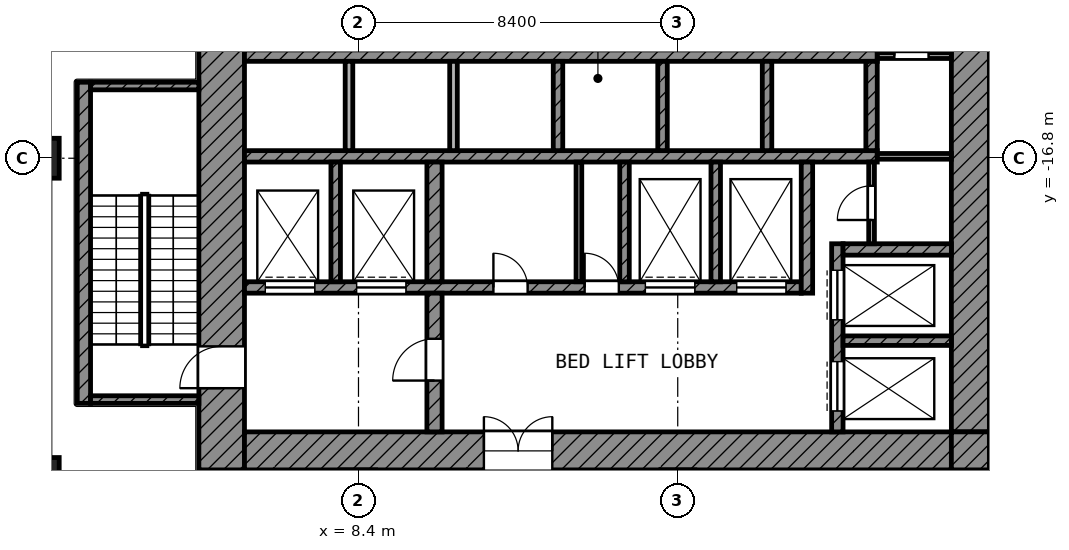
"""IFC4 building model, lengths in metres.
Left out: names, types, materials, properties, quantities, classifications, styles, units other than length and angle.
Written with IfcOpenShell. Run it as: python <this file> out.ifc"""

import sys

from ifc_helpers import new_model, si_unit, direction, frame, frame_2d, origin, origin_2d, place, context, subcontext, project, spatial, rectangle, extrude, element, fill, save


model = new_model("IFC4")
c1 = context("Model", 3, precision=1e-05, world=origin(), true_north=direction((0.0, 1.0)))
c2 = subcontext(c1, "Body", "Model", "MODEL_VIEW")
j1 = project(units=[si_unit("LENGTHUNIT", "METRE"), si_unit("PLANEANGLEUNIT", "RADIAN")], contexts=[c1])
p1 = place(None, origin())
s1 = spatial("IfcSite", under=j1, at=p1, CompositionType="ELEMENT")
p2 = place(p1, origin())
s2 = spatial("IfcBuilding", under=s1, at=p2, CompositionType="ELEMENT")
p3 = place(p2, frame((0.0, 0.0, 93.8)))
s3 = spatial("IfcBuildingStorey", under=s2, at=p3, CompositionType="ELEMENT", Elevation=93.8)
for number, where, z_axis, x_axis in (
    (1, (0.0, -16.8, 0.0), (0.0, 0.0, 1.0), (1.0, 0.0, 0.0)),
    (2, (0.0, -25.2, 0.0), (0.0, 0.0, 1.0), (1.0, 0.0, 0.0)),
):
    element("IfcColumn", number, at=place(p3, frame(where, z_axis=z_axis, x_axis=x_axis)), inside=s3, PredefinedType="COLUMN", context=c2, shape_type="SweptSolid", body=[
        extrude(rectangle(XDim=1.05, YDim=1.05, at=origin_2d()), origin(), (0.0, 0.0, 1.0), 5.0),
    ])
p4 = place(p3, frame((4.8, -25.0, 0.0), z_axis=(0.0, 0.0, 1.0), x_axis=(0.0, 1.0, 0.0)))
e3 = element("IfcWall", 3, at=p4, inside=s3, PredefinedType="SHEAR", context=c2, shape_type="SweptSolid", body=[
    extrude(rectangle(XDim=19.6, YDim=1.2, at=frame_2d((9.8, 0.0))), origin(), (0.0, 0.0, 1.0), 4.4),
])
p5 = place(p4, frame((11.45, 0.0, 0.0)))
e4 = element("IfcOpeningElement", 4, at=p5, cuts=e3, PredefinedType="OPENING", context=c2, shape_type="SweptSolid", body=[
    extrude(rectangle(XDim=1.1, YDim=2.1, at=frame_2d((0.55, 1.05))), frame((0.0, 0.61, 0.0), z_axis=(0.0, -1.0, 0.0), x_axis=(1.0, 0.0, 0.0)), (0.0, 0.0, 1.0), 1.22),
])
p6 = place(p4, frame((2.15, 0.0, 0.0)))
e5 = element("IfcOpeningElement", 5, at=p6, cuts=e3, PredefinedType="OPENING", context=c2, shape_type="SweptSolid", body=[
    extrude(rectangle(XDim=1.1, YDim=2.1, at=frame_2d((0.55, 1.05))), frame((0.0, 0.61, 0.0), z_axis=(0.0, -1.0, 0.0), x_axis=(1.0, 0.0, 0.0)), (0.0, 0.0, 1.0), 1.22),
])
p7 = place(p3, frame((24.5, -24.0, 0.0), z_axis=(0.0, 0.0, 1.0), x_axis=(0.0, 1.0, 0.0)))
e6 = element("IfcWall", 6, at=p7, inside=s3, PredefinedType="SHEAR", context=c2, shape_type="SweptSolid", body=[
    extrude(rectangle(XDim=18.6, YDim=1.0, at=frame_2d((9.3, 0.0))), origin(), (0.0, 0.0, 1.0), 4.4),
])
p8 = place(p7, frame((10.5, 0.0, 0.0)))
e7 = element("IfcOpeningElement", 7, at=p8, cuts=e6, PredefinedType="OPENING", context=c2, shape_type="SweptSolid", body=[
    extrude(rectangle(XDim=1.8, YDim=2.1, at=frame_2d((0.9, 1.05))), frame((0.0, 0.51, 0.0), z_axis=(0.0, -1.0, 0.0), x_axis=(1.0, 0.0, 0.0)), (0.0, 0.0, 1.0), 1.02),
])
p9 = place(p3, frame((5.4, -24.5, 0.0), z_axis=(0.0, 0.0, 1.0), x_axis=(1.0, 0.0, 0.0)))
e8 = element("IfcWall", 8, at=p9, inside=s3, PredefinedType="SHEAR", context=c2, shape_type="SweptSolid", body=[
    extrude(rectangle(XDim=18.6, YDim=1.0, at=frame_2d((9.3, 0.0))), origin(), (0.0, 0.0, 1.0), 4.4),
])
p10 = place(p9, frame((6.3, 0.0, 0.0)))
e9 = element("IfcOpeningElement", 9, at=p10, cuts=e8, PredefinedType="OPENING", context=c2, shape_type="SweptSolid", body=[
    extrude(rectangle(XDim=1.8, YDim=2.1, at=frame_2d((0.9, 1.05))), frame((0.0, 0.51, 0.0), z_axis=(0.0, -1.0, 0.0), x_axis=(1.0, 0.0, 0.0)), (0.0, 0.0, 1.0), 1.02),
])
p11 = place(p3, frame((24.5, -25.0, 0.0), z_axis=(0.0, 0.0, 1.0), x_axis=(0.0, 1.0, 0.0)))
e10 = element("IfcWall", 10, at=p11, inside=s3, PredefinedType="SHEAR", context=c2, shape_type="SweptSolid", body=[
    extrude(rectangle(XDim=1.0, YDim=1.0, at=frame_2d((0.5, 0.0))), origin(), (0.0, 0.0, 1.0), 4.4),
])
for number, where, z_axis, x_axis in (
    (11, (5.4, -14.1, 0.0), (0.0, 0.0, 1.0), (1.0, 0.0, 0.0)),
    (12, (5.4, -16.75, 0.0), (0.0, 0.0, 1.0), (1.0, 0.0, 0.0)),
):
    element("IfcWall", number, at=place(p3, frame(where, z_axis=z_axis, x_axis=x_axis)), inside=s3, PredefinedType="SHEAR", context=c2, shape_type="SweptSolid", body=[
        extrude(rectangle(XDim=16.65, YDim=0.3, at=frame_2d((8.325, 0.0))), origin(), (0.0, 0.0, 1.0), 4.4),
    ])
p12 = place(p3, frame((5.4, -20.2, 0.0), z_axis=(0.0, 0.0, 1.0), x_axis=(1.0, 0.0, 0.0)))
e13 = element("IfcWall", 13, at=p12, inside=s3, PredefinedType="SHEAR", context=c2, shape_type="SweptSolid", body=[
    extrude(rectangle(XDim=14.65, YDim=0.3, at=frame_2d((7.325, 0.0))), origin(), (0.0, 0.0, 1.0), 4.4),
])
p13 = place(p12, frame((10.55, 0.0, 0.0)))
e14 = element("IfcOpeningElement", 14, at=p13, cuts=e13, PredefinedType="OPENING", context=c2, shape_type="SweptSolid", body=[
    extrude(rectangle(XDim=1.3, YDim=2.1, at=frame_2d((0.65, 1.05))), frame((0.0, 0.16, 0.0), z_axis=(0.0, -1.0, 0.0), x_axis=(1.0, 0.0, 0.0)), (0.0, 0.0, 1.0), 0.32),
])
p14 = place(p12, frame((12.95, 0.0, 0.0)))
e15 = element("IfcOpeningElement", 15, at=p14, cuts=e13, PredefinedType="OPENING", context=c2, shape_type="SweptSolid", body=[
    extrude(rectangle(XDim=1.3, YDim=2.1, at=frame_2d((0.65, 1.05))), frame((0.0, 0.16, 0.0), z_axis=(0.0, -1.0, 0.0), x_axis=(1.0, 0.0, 0.0)), (0.0, 0.0, 1.0), 0.32),
])
p15 = place(p12, frame((0.55, 0.0, 0.0)))
e16 = element("IfcOpeningElement", 16, at=p15, cuts=e13, PredefinedType="OPENING", context=c2, shape_type="SweptSolid", body=[
    extrude(rectangle(XDim=1.3, YDim=2.1, at=frame_2d((0.65, 1.05))), frame((0.0, 0.16, 0.0), z_axis=(0.0, -1.0, 0.0), x_axis=(1.0, 0.0, 0.0)), (0.0, 0.0, 1.0), 0.32),
])
p16 = place(p12, frame((2.95, 0.0, 0.0)))
e17 = element("IfcOpeningElement", 17, at=p16, cuts=e13, PredefinedType="OPENING", context=c2, shape_type="SweptSolid", body=[
    extrude(rectangle(XDim=1.3, YDim=2.1, at=frame_2d((0.65, 1.05))), frame((0.0, 0.16, 0.0), z_axis=(0.0, -1.0, 0.0), x_axis=(1.0, 0.0, 0.0)), (0.0, 0.0, 1.0), 0.32),
])
p17 = place(p12, frame((6.55, 0.0, 0.0)))
e18 = element("IfcOpeningElement", 18, at=p17, cuts=e13, PredefinedType="OPENING", context=c2, shape_type="SweptSolid", body=[
    extrude(rectangle(XDim=0.9, YDim=2.1, at=frame_2d((0.45, 1.05))), frame((0.0, 0.16, 0.0), z_axis=(0.0, -1.0, 0.0), x_axis=(1.0, 0.0, 0.0)), (0.0, 0.0, 1.0), 0.32),
])
p18 = place(p12, frame((8.95, 0.0, 0.0)))
e19 = element("IfcOpeningElement", 19, at=p18, cuts=e13, PredefinedType="OPENING", context=c2, shape_type="SweptSolid", body=[
    extrude(rectangle(XDim=0.9, YDim=2.1, at=frame_2d((0.45, 1.05))), frame((0.0, 0.16, 0.0), z_axis=(0.0, -1.0, 0.0), x_axis=(1.0, 0.0, 0.0)), (0.0, 0.0, 1.0), 0.32),
])
p19 = place(p3, frame((10.4, -24.0, 0.0), z_axis=(0.0, 0.0, 1.0), x_axis=(0.0, 1.0, 0.0)))
e20 = element("IfcWall", 20, at=p19, inside=s3, PredefinedType="SHEAR", context=c2, shape_type="SweptSolid", body=[
    extrude(rectangle(XDim=3.65, YDim=0.4, at=frame_2d((1.825, 0.0))), origin(), (0.0, 0.0, 1.0), 4.4),
])
p20 = place(p19, frame((1.35, 0.0, 0.0)))
e21 = element("IfcOpeningElement", 21, at=p20, cuts=e20, PredefinedType="OPENING", context=c2, shape_type="SweptSolid", body=[
    extrude(rectangle(XDim=1.1, YDim=2.1, at=frame_2d((0.55, 1.05))), frame((0.0, 0.21, 0.0), z_axis=(0.0, -1.0, 0.0), x_axis=(1.0, 0.0, 0.0)), (0.0, 0.0, 1.0), 0.42),
])
p21 = place(p3, frame((10.4, -20.05, 0.0), z_axis=(0.0, 0.0, 1.0), x_axis=(0.0, 1.0, 0.0)))
e22 = element("IfcWall", 22, at=p21, inside=s3, PredefinedType="SHEAR", context=c2, shape_type="SweptSolid", body=[
    extrude(rectangle(XDim=3.15, YDim=0.4, at=frame_2d((1.575, 0.0))), origin(), (0.0, 0.0, 1.0), 4.4),
])
p22 = place(p3, frame((20.2, -20.35, 0.0), z_axis=(0.0, 0.0, 1.0), x_axis=(0.0, 1.0, 0.0)))
e23 = element("IfcWall", 23, at=p22, inside=s3, PredefinedType="SHEAR", context=c2, shape_type="SweptSolid", body=[
    extrude(rectangle(XDim=3.45, YDim=0.3, at=frame_2d((1.725, 0.0))), origin(), (0.0, 0.0, 1.0), 4.4),
])
p23 = place(p3, frame((21.9, -16.6, 0.0), z_axis=(0.0, 0.0, 1.0), x_axis=(0.0, 1.0, 0.0)))
e24 = element("IfcWall", 24, at=p23, inside=s3, PredefinedType="SHEAR", context=c2, shape_type="SweptSolid", body=[
    extrude(rectangle(XDim=2.35, YDim=0.3, at=frame_2d((1.175, 0.0))), origin(), (0.0, 0.0, 1.0), 4.4),
])
p24 = place(p3, frame((21.15, -19.2, 0.0), z_axis=(0.0, 0.0, 1.0), x_axis=(1.0, 0.0, 0.0)))
e25 = element("IfcWall", 25, at=p24, inside=s3, PredefinedType="SHEAR", context=c2, shape_type="SweptSolid", body=[
    extrude(rectangle(XDim=2.85, YDim=0.3, at=frame_2d((1.425, 0.0))), origin(), (0.0, 0.0, 1.0), 4.4),
])
p25 = place(p3, frame((21.0, -24.0, 0.0), z_axis=(0.0, 0.0, 1.0), x_axis=(0.0, 1.0, 0.0)))
e26 = element("IfcWall", 26, at=p25, inside=s3, PredefinedType="SHEAR", context=c2, shape_type="SweptSolid", body=[
    extrude(rectangle(XDim=4.95, YDim=0.3, at=frame_2d((2.475, 0.0))), origin(), (0.0, 0.0, 1.0), 4.4),
])
p26 = place(p25, frame((2.95, 0.0, 0.0)))
e27 = element("IfcOpeningElement", 27, at=p26, cuts=e26, PredefinedType="OPENING", context=c2, shape_type="SweptSolid", body=[
    extrude(rectangle(XDim=1.3, YDim=2.1, at=frame_2d((0.65, 1.05))), frame((0.0, 0.16, 0.0), z_axis=(0.0, -1.0, 0.0), x_axis=(1.0, 0.0, 0.0)), (0.0, 0.0, 1.0), 0.32),
])
p27 = place(p25, frame((0.55, 0.0, 0.0)))
e28 = element("IfcOpeningElement", 28, at=p27, cuts=e26, PredefinedType="OPENING", context=c2, shape_type="SweptSolid", body=[
    extrude(rectangle(XDim=1.3, YDim=2.1, at=frame_2d((0.65, 1.05))), frame((0.0, 0.16, 0.0), z_axis=(0.0, -1.0, 0.0), x_axis=(1.0, 0.0, 0.0)), (0.0, 0.0, 1.0), 0.32),
])
p28 = place(p3, frame((21.15, -21.6, 0.0), z_axis=(0.0, 0.0, 1.0), x_axis=(1.0, 0.0, 0.0)))
e29 = element("IfcWall", 29, at=p28, inside=s3, PredefinedType="SHEAR", context=c2, shape_type="SweptSolid", body=[
    extrude(rectangle(XDim=2.85, YDim=0.25, at=frame_2d((1.425, 0.0))), origin(), (0.0, 0.0, 1.0), 4.4),
])
for number, where, z_axis, x_axis in (
    (30, (7.8, -20.05, 0.0), (0.0, 0.0, 1.0), (0.0, 1.0, 0.0)),
    (31, (15.4, -20.05, 0.0), (0.0, 0.0, 1.0), (0.0, 1.0, 0.0)),
    (32, (17.8, -20.05, 0.0), (0.0, 0.0, 1.0), (0.0, 1.0, 0.0)),
):
    element("IfcWall", number, at=place(p3, frame(where, z_axis=z_axis, x_axis=x_axis)), inside=s3, PredefinedType="SHEAR", context=c2, shape_type="SweptSolid", body=[
        extrude(rectangle(XDim=3.15, YDim=0.25, at=frame_2d((1.575, 0.0))), origin(), (0.0, 0.0, 1.0), 4.4),
    ])
for number, where, z_axis, x_axis in (
    (33, (8.15, -16.6, 0.0), (0.0, 0.0, 1.0), (0.0, 1.0, 0.0)),
    (34, (10.9, -16.6, 0.0), (0.0, 0.0, 1.0), (0.0, 1.0, 0.0)),
):
    element("IfcWall", number, at=place(p3, frame(where, z_axis=z_axis, x_axis=x_axis)), inside=s3, PredefinedType="PARTITIONING", context=c2, shape_type="SweptSolid", body=[
        extrude(rectangle(XDim=2.35, YDim=0.2, at=frame_2d((1.175, 0.0))), origin(), (0.0, 0.0, 1.0), 4.4),
    ])
for number, where, z_axis, x_axis in (
    (35, (13.65, -16.6, 0.0), (0.0, 0.0, 1.0), (0.0, 1.0, 0.0)),
    (36, (16.4, -16.6, 0.0), (0.0, 0.0, 1.0), (0.0, 1.0, 0.0)),
    (37, (19.15, -16.6, 0.0), (0.0, 0.0, 1.0), (0.0, 1.0, 0.0)),
):
    element("IfcWall", number, at=place(p3, frame(where, z_axis=z_axis, x_axis=x_axis)), inside=s3, PredefinedType="SHEAR", context=c2, shape_type="SweptSolid", body=[
        extrude(rectangle(XDim=2.35, YDim=0.25, at=frame_2d((1.175, 0.0))), origin(), (0.0, 0.0, 1.0), 4.4),
    ])
p29 = place(p3, frame((21.9, -19.05, 0.0), z_axis=(0.0, 0.0, 1.0), x_axis=(0.0, 1.0, 0.0)))
e38 = element("IfcWall", 38, at=p29, inside=s3, PredefinedType="PARTITIONING", context=c2, shape_type="SweptSolid", body=[
    extrude(rectangle(XDim=2.15, YDim=0.15, at=frame_2d((1.075, 0.0))), origin(), (0.0, 0.0, 1.0), 4.4),
])
p30 = place(p29, frame((0.625, 0.0, 0.0)))
e39 = element("IfcOpeningElement", 39, at=p30, cuts=e38, PredefinedType="OPENING", context=c2, shape_type="SweptSolid", body=[
    extrude(rectangle(XDim=0.9, YDim=2.1, at=frame_2d((0.45, 1.05))), frame((0.0, 0.085, 0.0), z_axis=(0.0, -1.0, 0.0), x_axis=(1.0, 0.0, 0.0)), (0.0, 0.0, 1.0), 0.17),
])
p31 = place(p3, frame((22.05, -16.75, 0.0), z_axis=(0.0, 0.0, 1.0), x_axis=(1.0, 0.0, 0.0)))
e40 = element("IfcWall", 40, at=p31, inside=s3, PredefinedType="PARTITIONING", context=c2, shape_type="SweptSolid", body=[
    extrude(rectangle(XDim=1.95, YDim=0.15, at=frame_2d((0.975, 0.0))), origin(), (0.0, 0.0, 1.0), 4.4),
])
p32 = place(p3, frame((22.05, -14.1, 0.0), z_axis=(0.0, 0.0, 1.0), x_axis=(1.0, 0.0, 0.0)))
e41 = element("IfcWall", 41, at=p32, inside=s3, PredefinedType="PARTITIONING", context=c2, shape_type="SweptSolid", body=[
    extrude(rectangle(XDim=1.95, YDim=0.15, at=frame_2d((0.975, 0.0))), origin(), (0.0, 0.0, 1.0), 4.4),
])
p33 = place(p32, frame((0.45, 0.0, 0.0)))
e42 = element("IfcOpeningElement", 42, at=p33, cuts=e41, PredefinedType="OPENING", context=c2, shape_type="SweptSolid", body=[
    extrude(rectangle(XDim=0.9, YDim=2.1, at=frame_2d((0.45, 1.05))), frame((0.0, 0.085, 0.0), z_axis=(0.0, -1.0, 0.0), x_axis=(1.0, 0.0, 0.0)), (0.0, 0.0, 1.0), 0.17),
])
p34 = place(p3, frame((14.2, -20.05, 0.0), z_axis=(0.0, 0.0, 1.0), x_axis=(0.0, 1.0, 0.0)))
e43 = element("IfcWall", 43, at=p34, inside=s3, PredefinedType="PARTITIONING", context=c2, shape_type="SweptSolid", body=[
    extrude(rectangle(XDim=3.15, YDim=0.15, at=frame_2d((1.575, 0.0))), origin(), (0.0, 0.0, 1.0), 4.4),
])
p35 = place(p3, frame((1.175, -23.25, 0.0), z_axis=(0.0, 0.0, 1.0), x_axis=(0.0, 1.0, 0.0)))
e44 = element("IfcWall", 44, at=p35, inside=s3, PredefinedType="SHEAR", context=c2, shape_type="SweptSolid", body=[
    extrude(rectangle(XDim=8.45, YDim=0.35, at=frame_2d((4.225, 0.0))), origin(), (0.0, 0.0, 1.0), 4.4),
])
for number, where, z_axis, x_axis in (
    (45, (1.35, -14.9, 0.0), (0.0, 0.0, 1.0), (1.0, 0.0, 0.0)),
    (46, (1.35, -23.15, 0.0), (0.0, 0.0, 1.0), (1.0, 0.0, 0.0)),
):
    element("IfcWall", number, at=place(p3, frame(where, z_axis=z_axis, x_axis=x_axis)), inside=s3, PredefinedType="SHEAR", context=c2, shape_type="SweptSolid", body=[
        extrude(rectangle(XDim=2.85, YDim=0.2, at=frame_2d((1.425, 0.0))), origin(), (0.0, 0.0, 1.0), 4.4),
    ])
p36 = place(p26, origin())
e47 = element("IfcDoor", 47, at=p36, inside=s3, OperationType="DOUBLE_DOOR_SLIDING", PredefinedType="DOOR", context=c2, shape_type="SweptSolid", body=[
    extrude(rectangle(XDim=1.3, YDim=2.1, at=frame_2d((0.65, 1.05))), frame((0.0, 0.025, 0.0), z_axis=(0.0, -1.0, 0.0), x_axis=(1.0, 0.0, 0.0)), (0.0, 0.0, 1.0), 0.05),
])
fill(e27, e47)
p37 = place(p27, origin())
e48 = element("IfcDoor", 48, at=p37, inside=s3, OperationType="DOUBLE_DOOR_SLIDING", PredefinedType="DOOR", context=c2, shape_type="SweptSolid", body=[
    extrude(rectangle(XDim=1.3, YDim=2.1, at=frame_2d((0.65, 1.05))), frame((0.0, 0.025, 0.0), z_axis=(0.0, -1.0, 0.0), x_axis=(1.0, 0.0, 0.0)), (0.0, 0.0, 1.0), 0.05),
])
fill(e28, e48)
p38 = place(p13, origin())
e49 = element("IfcDoor", 49, at=p38, inside=s3, OperationType="DOUBLE_DOOR_SLIDING", PredefinedType="DOOR", context=c2, shape_type="SweptSolid", body=[
    extrude(rectangle(XDim=1.3, YDim=2.1, at=frame_2d((0.65, 1.05))), frame((0.0, 0.025, 0.0), z_axis=(0.0, -1.0, 0.0), x_axis=(1.0, 0.0, 0.0)), (0.0, 0.0, 1.0), 0.05),
])
fill(e14, e49)
p39 = place(p14, origin())
e50 = element("IfcDoor", 50, at=p39, inside=s3, OperationType="DOUBLE_DOOR_SLIDING", PredefinedType="DOOR", context=c2, shape_type="SweptSolid", body=[
    extrude(rectangle(XDim=1.3, YDim=2.1, at=frame_2d((0.65, 1.05))), frame((0.0, 0.025, 0.0), z_axis=(0.0, -1.0, 0.0), x_axis=(1.0, 0.0, 0.0)), (0.0, 0.0, 1.0), 0.05),
])
fill(e15, e50)
p40 = place(p15, origin())
e51 = element("IfcDoor", 51, at=p40, inside=s3, OperationType="DOUBLE_DOOR_SLIDING", PredefinedType="DOOR", context=c2, shape_type="SweptSolid", body=[
    extrude(rectangle(XDim=1.3, YDim=2.1, at=frame_2d((0.65, 1.05))), frame((0.0, 0.025, 0.0), z_axis=(0.0, -1.0, 0.0), x_axis=(1.0, 0.0, 0.0)), (0.0, 0.0, 1.0), 0.05),
])
fill(e16, e51)
p41 = place(p16, origin())
e52 = element("IfcDoor", 52, at=p41, inside=s3, OperationType="DOUBLE_DOOR_SLIDING", PredefinedType="DOOR", context=c2, shape_type="SweptSolid", body=[
    extrude(rectangle(XDim=1.3, YDim=2.1, at=frame_2d((0.65, 1.05))), frame((0.0, 0.025, 0.0), z_axis=(0.0, -1.0, 0.0), x_axis=(1.0, 0.0, 0.0)), (0.0, 0.0, 1.0), 0.05),
])
fill(e17, e52)
p42 = place(p6, origin())
e53 = element("IfcDoor", 53, at=p42, inside=s3, OperationType="SINGLE_SWING_LEFT", PredefinedType="DOOR", context=c2, shape_type="SweptSolid", body=[
    extrude(rectangle(XDim=1.1, YDim=2.1, at=frame_2d((0.55, 1.05))), frame((0.0, 0.025, 0.0), z_axis=(0.0, -1.0, 0.0), x_axis=(1.0, 0.0, 0.0)), (0.0, 0.0, 1.0), 0.05),
])
fill(e5, e53)
p43 = place(p20, origin())
e54 = element("IfcDoor", 54, at=p43, inside=s3, OperationType="SINGLE_SWING_LEFT", PredefinedType="DOOR", context=c2, shape_type="SweptSolid", body=[
    extrude(rectangle(XDim=1.1, YDim=2.1, at=frame_2d((0.55, 1.05))), frame((0.0, 0.025, 0.0), z_axis=(0.0, -1.0, 0.0), x_axis=(1.0, 0.0, 0.0)), (0.0, 0.0, 1.0), 0.05),
])
fill(e21, e54)
p44 = place(p10, origin())
e55 = element("IfcDoor", 55, at=p44, inside=s3, OperationType="DOUBLE_DOOR_SINGLE_SWING", PredefinedType="DOOR", context=c2, shape_type="SweptSolid", body=[
    extrude(rectangle(XDim=1.8, YDim=2.1, at=frame_2d((0.9, 1.05))), frame((0.0, 0.025, 0.0), z_axis=(0.0, -1.0, 0.0), x_axis=(1.0, 0.0, 0.0)), (0.0, 0.0, 1.0), 0.05),
])
fill(e9, e55)
p45 = place(p33, origin())
e56 = element("IfcDoor", 56, at=p45, inside=s3, OperationType="SINGLE_SWING_LEFT", PredefinedType="DOOR", context=c2, shape_type="SweptSolid", body=[
    extrude(rectangle(XDim=0.9, YDim=2.1, at=frame_2d((0.45, 1.05))), frame((0.0, 0.025, 0.0), z_axis=(0.0, -1.0, 0.0), x_axis=(1.0, 0.0, 0.0)), (0.0, 0.0, 1.0), 0.05),
])
fill(e42, e56)
p46 = place(p30, origin())
e57 = element("IfcDoor", 57, at=p46, inside=s3, OperationType="SINGLE_SWING_LEFT", PredefinedType="DOOR", context=c2, shape_type="SweptSolid", body=[
    extrude(rectangle(XDim=0.9, YDim=2.1, at=frame_2d((0.45, 1.05))), frame((0.0, 0.025, 0.0), z_axis=(0.0, -1.0, 0.0), x_axis=(1.0, 0.0, 0.0)), (0.0, 0.0, 1.0), 0.05),
])
fill(e39, e57)
p47 = place(p17, origin())
e58 = element("IfcDoor", 58, at=p47, inside=s3, OperationType="SINGLE_SWING_LEFT", PredefinedType="DOOR", context=c2, shape_type="SweptSolid", body=[
    extrude(rectangle(XDim=0.9, YDim=2.1, at=frame_2d((0.45, 1.05))), frame((0.0, 0.025, 0.0), z_axis=(0.0, -1.0, 0.0), x_axis=(1.0, 0.0, 0.0)), (0.0, 0.0, 1.0), 0.05),
])
fill(e18, e58)
p48 = place(p18, origin())
e59 = element("IfcDoor", 59, at=p48, inside=s3, OperationType="SINGLE_SWING_LEFT", PredefinedType="DOOR", context=c2, shape_type="SweptSolid", body=[
    extrude(rectangle(XDim=0.9, YDim=2.1, at=frame_2d((0.45, 1.05))), frame((0.0, 0.025, 0.0), z_axis=(0.0, -1.0, 0.0), x_axis=(1.0, 0.0, 0.0)), (0.0, 0.0, 1.0), 0.05),
])
fill(e19, e59)
save(model, sys.argv[1])
